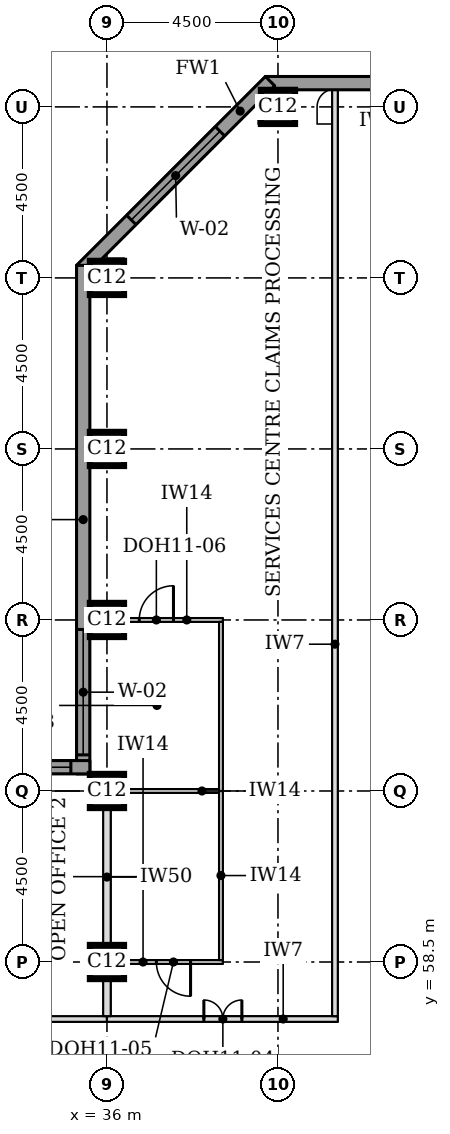
"""IFC4 building model, lengths in metres.
Left out: names, types, materials, properties, quantities, classifications, styles, units other than length and angle.
Written with IfcOpenShell. Run it as: python <this file> out.ifc"""

import sys

from ifc_helpers import new_model, si_unit, direction, frame, frame_2d, origin, origin_2d, place, context, subcontext, project, spatial, rectangle, extrude, element, fill, save


model = new_model("IFC4")
c1 = context("Model", 3, precision=1e-05, world=origin(), true_north=direction((0.0, 1.0)))
c2 = subcontext(c1, "Body", "Model", "MODEL_VIEW")
j1 = project(units=[si_unit("LENGTHUNIT", "METRE"), si_unit("PLANEANGLEUNIT", "RADIAN")], contexts=[c1])
p1 = place(None, origin())
s1 = spatial("IfcSite", under=j1, at=p1, CompositionType="ELEMENT")
p2 = place(p1, origin())
s2 = spatial("IfcBuilding", under=s1, at=p2, CompositionType="ELEMENT")
p3 = place(p2, frame((0.0, 0.0, 237.8)))
s3 = spatial("IfcBuildingStorey", under=s2, at=p3, CompositionType="ELEMENT", Elevation=237.8)
for number, where, z_axis, x_axis in (
    (1, (36.0, 58.5, 0.0), (0.0, 0.0, 1.0), (1.0, 0.0, 0.0)),
    (2, (36.0, 63.0, 0.0), (0.0, 0.0, 1.0), (1.0, 0.0, 0.0)),
    (3, (36.0, 67.5, 0.0), (0.0, 0.0, 1.0), (1.0, 0.0, 0.0)),
    (4, (36.0, 72.0, 0.0), (0.0, 0.0, 1.0), (1.0, 0.0, 0.0)),
    (5, (36.0, 76.5, 0.0), (0.0, 0.0, 1.0), (1.0, 0.0, 0.0)),
    (6, (40.5, 81.0, 0.0), (0.0, 0.0, 1.0), (1.0, 0.0, 0.0)),
):
    element("IfcColumn", number, at=place(p3, frame(where, z_axis=z_axis, x_axis=x_axis)), inside=s3, PredefinedType="COLUMN", context=c2, shape_type="SweptSolid", body=[
        extrude(rectangle(XDim=0.9, YDim=0.9, at=origin_2d()), origin(), (0.0, 0.0, 1.0), 3.7),
    ])
p4 = place(p3, frame((72.331, 81.625, 0.0), z_axis=(0.0, 0.0, 1.0), x_axis=(-1.0, 0.0, 0.0)))
e7 = element("IfcWall", 7, at=p4, inside=s3, PredefinedType="STANDARD", context=c2, shape_type="SweptSolid", body=[
    extrude(rectangle(XDim=32.163, YDim=0.35, at=frame_2d((16.081, 0.0))), origin(), (0.0, 0.0, 1.0), 3.525),
])
p5 = place(p4, frame((5.431, 0.0, 0.9)))
e8 = element("IfcOpeningElement", 8, at=p5, cuts=e7, PredefinedType="OPENING", context=c2, shape_type="SweptSolid", body=[
    extrude(rectangle(XDim=3.3, YDim=1.9, at=frame_2d((1.65, 0.95))), frame((0.0, 0.185, 0.0), z_axis=(0.0, -1.0, 0.0), x_axis=(1.0, 0.0, 0.0)), (0.0, 0.0, 1.0), 0.37),
])
p6 = place(p4, frame((9.931, 0.0, 0.9)))
e9 = element("IfcOpeningElement", 9, at=p6, cuts=e7, PredefinedType="OPENING", context=c2, shape_type="SweptSolid", body=[
    extrude(rectangle(XDim=3.3, YDim=1.9, at=frame_2d((1.65, 0.95))), frame((0.0, 0.185, 0.0), z_axis=(0.0, -1.0, 0.0), x_axis=(1.0, 0.0, 0.0)), (0.0, 0.0, 1.0), 0.37),
])
p7 = place(p4, frame((14.431, 0.0, 0.9)))
e10 = element("IfcOpeningElement", 10, at=p7, cuts=e7, PredefinedType="OPENING", context=c2, shape_type="SweptSolid", body=[
    extrude(rectangle(XDim=3.3, YDim=1.9, at=frame_2d((1.65, 0.95))), frame((0.0, 0.185, 0.0), z_axis=(0.0, -1.0, 0.0), x_axis=(1.0, 0.0, 0.0)), (0.0, 0.0, 1.0), 0.37),
])
p8 = place(p4, frame((18.931, 0.0, 0.9)))
e11 = element("IfcOpeningElement", 11, at=p8, cuts=e7, PredefinedType="OPENING", context=c2, shape_type="SweptSolid", body=[
    extrude(rectangle(XDim=3.3, YDim=1.9, at=frame_2d((1.65, 0.95))), frame((0.0, 0.185, 0.0), z_axis=(0.0, -1.0, 0.0), x_axis=(1.0, 0.0, 0.0)), (0.0, 0.0, 1.0), 0.37),
])
p9 = place(p4, frame((23.431, 0.0, 0.9)))
e12 = element("IfcOpeningElement", 12, at=p9, cuts=e7, PredefinedType="OPENING", context=c2, shape_type="SweptSolid", body=[
    extrude(rectangle(XDim=3.3, YDim=1.9, at=frame_2d((1.65, 0.95))), frame((0.0, 0.185, 0.0), z_axis=(0.0, -1.0, 0.0), x_axis=(1.0, 0.0, 0.0)), (0.0, 0.0, 1.0), 0.37),
])
p10 = place(p3, frame((40.292, 81.676, 0.0), z_axis=(0.0, 0.0, 1.0), x_axis=(-0.707106781187, -0.707106781187, 0.0)))
e13 = element("IfcWall", 13, at=p10, inside=s3, PredefinedType="STANDARD", context=c2, shape_type="SweptSolid", body=[
    extrude(rectangle(XDim=7.027, YDim=0.35, at=frame_2d((3.513, 0.0))), origin(), (0.0, 0.0, 1.0), 3.525),
])
p11 = place(p10, frame((1.863, 0.0, 0.9)))
e14 = element("IfcOpeningElement", 14, at=p11, cuts=e13, PredefinedType="OPENING", context=c2, shape_type="SweptSolid", body=[
    extrude(rectangle(XDim=3.3, YDim=1.9, at=frame_2d((1.65, 0.95))), frame((0.0, 0.185, 0.0), z_axis=(0.0, -1.0, 0.0), x_axis=(1.0, 0.0, 0.0)), (0.0, 0.0, 1.0), 0.37),
])
p12 = place(p3, frame((35.375, 76.831, 0.0), z_axis=(0.0, 0.0, 1.0), x_axis=(0.0, -1.0, 0.0)))
e15 = element("IfcWall", 15, at=p12, inside=s3, PredefinedType="STANDARD", context=c2, shape_type="SweptSolid", body=[
    extrude(rectangle(XDim=13.381, YDim=0.35, at=frame_2d((6.691, 0.0))), origin(), (0.0, 0.0, 1.0), 3.525),
])
p13 = place(p12, frame((9.581, 0.0, 0.9)))
e16 = element("IfcOpeningElement", 16, at=p13, cuts=e15, PredefinedType="OPENING", context=c2, shape_type="SweptSolid", body=[
    extrude(rectangle(XDim=3.3, YDim=1.9, at=frame_2d((1.65, 0.95))), frame((0.0, 0.185, 0.0), z_axis=(0.0, -1.0, 0.0), x_axis=(1.0, 0.0, 0.0)), (0.0, 0.0, 1.0), 0.37),
])
p14 = place(p3, frame((35.55, 63.625, 0.0), z_axis=(0.0, 0.0, 1.0), x_axis=(-1.0, 0.0, 0.0)))
e17 = element("IfcWall", 17, at=p14, inside=s3, PredefinedType="STANDARD", context=c2, shape_type="SweptSolid", body=[
    extrude(rectangle(XDim=17.881, YDim=0.35, at=frame_2d((8.941, 0.0))), origin(), (0.0, 0.0, 1.0), 3.525),
])
p15 = place(p14, frame((0.5, 0.0, 0.9)))
e18 = element("IfcOpeningElement", 18, at=p15, cuts=e17, PredefinedType="OPENING", context=c2, shape_type="SweptSolid", body=[
    extrude(rectangle(XDim=3.3, YDim=1.9, at=frame_2d((1.65, 0.95))), frame((0.0, 0.185, 0.0), z_axis=(0.0, -1.0, 0.0), x_axis=(1.0, 0.0, 0.0)), (0.0, 0.0, 1.0), 0.37),
])
p16 = place(p14, frame((9.15, 0.0, 0.9)))
e19 = element("IfcOpeningElement", 19, at=p16, cuts=e17, PredefinedType="OPENING", context=c2, shape_type="SweptSolid", body=[
    extrude(rectangle(XDim=3.3, YDim=1.9, at=frame_2d((1.65, 0.95))), frame((0.0, 0.185, 0.0), z_axis=(0.0, -1.0, 0.0), x_axis=(1.0, 0.0, 0.0)), (0.0, 0.0, 1.0), 0.37),
])
p17 = place(p3, frame((29.38, 57.0, 0.0), z_axis=(0.0, 0.0, 1.0), x_axis=(1.0, 0.0, 0.0)))
e20 = element("IfcWall", 20, at=p17, inside=s3, PredefinedType="PARTITIONING", context=c2, shape_type="SweptSolid", body=[
    extrude(rectangle(XDim=6.62, YDim=0.15, at=frame_2d((3.31, 0.0))), origin(), (0.0, 0.0, 1.0), 3.55),
])
p18 = place(p17, frame((2.88, 0.0, 0.0)))
e21 = element("IfcOpeningElement", 21, at=p18, cuts=e20, PredefinedType="OPENING", context=c2, shape_type="SweptSolid", body=[
    extrude(rectangle(XDim=1.0, YDim=2.1, at=frame_2d((0.5, 1.05))), frame((0.0, 0.085, 0.0), z_axis=(0.0, -1.0, 0.0), x_axis=(1.0, 0.0, 0.0)), (0.0, 0.0, 1.0), 0.17),
])
p19 = place(p3, frame((36.0, 57.0, 0.0), z_axis=(0.0, 0.0, 1.0), x_axis=(1.0, 0.0, 0.0)))
e22 = element("IfcWall", 22, at=p19, inside=s3, PredefinedType="PARTITIONING", context=c2, shape_type="SweptSolid", body=[
    extrude(rectangle(XDim=6.075, YDim=0.15, at=frame_2d((3.038, 0.0))), origin(), (0.0, 0.0, 1.0), 3.55),
])
p20 = place(p19, frame((2.55, 0.0, 0.0)))
e23 = element("IfcOpeningElement", 23, at=p20, cuts=e22, PredefinedType="OPENING", context=c2, shape_type="SweptSolid", body=[
    extrude(rectangle(XDim=1.0, YDim=2.1, at=frame_2d((0.5, 1.05))), frame((0.0, 0.085, 0.0), z_axis=(0.0, -1.0, 0.0), x_axis=(1.0, 0.0, 0.0)), (0.0, 0.0, 1.0), 0.17),
])
p21 = place(p3, frame((36.45, 58.5, 0.0), z_axis=(0.0, 0.0, 1.0), x_axis=(1.0, 0.0, 0.0)))
e24 = element("IfcWall", 24, at=p21, inside=s3, PredefinedType="PARTITIONING", context=c2, shape_type="SweptSolid", body=[
    extrude(rectangle(XDim=2.6, YDim=0.1, at=frame_2d((1.3, 0.0))), origin(), (0.0, 0.0, 1.0), 3.55),
])
p22 = place(p21, frame((0.85, 0.0, 0.0)))
e25 = element("IfcOpeningElement", 25, at=p22, cuts=e24, PredefinedType="OPENING", context=c2, shape_type="SweptSolid", body=[
    extrude(rectangle(XDim=0.9, YDim=2.1, at=frame_2d((0.45, 1.05))), frame((0.0, 0.06, 0.0), z_axis=(0.0, -1.0, 0.0), x_axis=(1.0, 0.0, 0.0)), (0.0, 0.0, 1.0), 0.12),
])
p23 = place(p3, frame((36.45, 63.0, 0.0), z_axis=(0.0, 0.0, 1.0), x_axis=(1.0, 0.0, 0.0)))
e26 = element("IfcWall", 26, at=p23, inside=s3, PredefinedType="PARTITIONING", context=c2, shape_type="SweptSolid", body=[
    extrude(rectangle(XDim=2.5, YDim=0.1, at=frame_2d((1.25, 0.0))), origin(), (0.0, 0.0, 1.0), 3.55),
])
p24 = place(p3, frame((35.55, 67.5, 0.0), z_axis=(0.0, 0.0, 1.0), x_axis=(1.0, 0.0, 0.0)))
e27 = element("IfcWall", 27, at=p24, inside=s3, PredefinedType="PARTITIONING", context=c2, shape_type="SweptSolid", body=[
    extrude(rectangle(XDim=3.5, YDim=0.1, at=frame_2d((1.75, 0.0))), origin(), (0.0, 0.0, 1.0), 3.55),
])
p25 = place(p24, frame((1.3, 0.0, 0.0)))
e28 = element("IfcOpeningElement", 28, at=p25, cuts=e27, PredefinedType="OPENING", context=c2, shape_type="SweptSolid", body=[
    extrude(rectangle(XDim=0.9, YDim=2.1, at=frame_2d((0.45, 1.05))), frame((0.0, 0.06, 0.0), z_axis=(0.0, -1.0, 0.0), x_axis=(1.0, 0.0, 0.0)), (0.0, 0.0, 1.0), 0.12),
])
p26 = place(p3, frame((36.0, 57.075, 0.0), z_axis=(0.0, 0.0, 1.0), x_axis=(0.0, 1.0, 0.0)))
e29 = element("IfcWall", 29, at=p26, inside=s3, PredefinedType="PARTITIONING", context=c2, shape_type="SweptSolid", body=[
    extrude(rectangle(XDim=0.975, YDim=0.2, at=frame_2d((0.488, 0.0))), origin(), (0.0, 0.0, 1.0), 2.8),
])
p27 = place(p3, frame((42.0, 57.075, 0.0), z_axis=(0.0, 0.0, 1.0), x_axis=(0.0, 1.0, 0.0)))
e30 = element("IfcWall", 30, at=p27, inside=s3, PredefinedType="PARTITIONING", context=c2, shape_type="SweptSolid", body=[
    extrude(rectangle(XDim=24.375, YDim=0.15, at=frame_2d((12.188, 0.0))), origin(), (0.0, 0.0, 1.0), 3.55),
])
p28 = place(p3, frame((39.0, 58.55, 0.0), z_axis=(0.0, 0.0, 1.0), x_axis=(0.0, 1.0, 0.0)))
e31 = element("IfcWall", 31, at=p28, inside=s3, PredefinedType="PARTITIONING", context=c2, shape_type="SweptSolid", body=[
    extrude(rectangle(XDim=4.45, YDim=0.1, at=frame_2d((2.225, 0.0))), origin(), (0.0, 0.0, 1.0), 3.55),
])
p29 = place(p3, frame((36.0, 58.92, 0.0), z_axis=(0.0, 0.0, 1.0), x_axis=(0.0, 1.0, 0.0)))
e32 = element("IfcWall", 32, at=p29, inside=s3, PredefinedType="PARTITIONING", context=c2, shape_type="SweptSolid", body=[
    extrude(rectangle(XDim=3.63, YDim=0.2, at=frame_2d((1.815, 0.0))), origin(), (0.0, 0.0, 1.0), 2.8),
])
p30 = place(p3, frame((39.0, 63.0, 0.0), z_axis=(0.0, 0.0, 1.0), x_axis=(0.0, 1.0, 0.0)))
e33 = element("IfcWall", 33, at=p30, inside=s3, PredefinedType="PARTITIONING", context=c2, shape_type="SweptSolid", body=[
    extrude(rectangle(XDim=4.45, YDim=0.1, at=frame_2d((2.225, 0.0))), origin(), (0.0, 0.0, 1.0), 3.55),
])
p31 = place(p11, origin())
e34 = element("IfcWindow", 34, at=p31, inside=s3, PartitioningType="SINGLE_PANEL", PredefinedType="WINDOW", context=c2, shape_type="SweptSolid", body=[
    extrude(rectangle(XDim=3.3, YDim=1.9, at=frame_2d((1.65, 0.95))), frame((0.0, 0.085, 0.0), z_axis=(0.0, -1.0, 0.0), x_axis=(1.0, 0.0, 0.0)), (0.0, 0.0, 1.0), 0.06),
])
fill(e14, e34)
p32 = place(p13, origin())
e35 = element("IfcWindow", 35, at=p32, inside=s3, PartitioningType="SINGLE_PANEL", PredefinedType="WINDOW", context=c2, shape_type="SweptSolid", body=[
    extrude(rectangle(XDim=3.3, YDim=1.9, at=frame_2d((1.65, 0.95))), frame((0.0, 0.085, 0.0), z_axis=(0.0, -1.0, 0.0), x_axis=(1.0, 0.0, 0.0)), (0.0, 0.0, 1.0), 0.06),
])
fill(e16, e35)
p33 = place(p15, origin())
e36 = element("IfcWindow", 36, at=p33, inside=s3, PartitioningType="SINGLE_PANEL", PredefinedType="WINDOW", context=c2, shape_type="SweptSolid", body=[
    extrude(rectangle(XDim=3.3, YDim=1.9, at=frame_2d((1.65, 0.95))), frame((0.0, 0.085, 0.0), z_axis=(0.0, -1.0, 0.0), x_axis=(1.0, 0.0, 0.0)), (0.0, 0.0, 1.0), 0.06),
])
fill(e18, e36)
p34 = place(p20, origin())
e37 = element("IfcDoor", 37, at=p34, inside=s3, OperationType="DOUBLE_DOOR_SINGLE_SWING", PredefinedType="DOOR", context=c2, shape_type="SweptSolid", body=[
    extrude(rectangle(XDim=1.0, YDim=2.1, at=frame_2d((0.5, 1.05))), frame((0.0, 0.025, 0.0), z_axis=(0.0, -1.0, 0.0), x_axis=(1.0, 0.0, 0.0)), (0.0, 0.0, 1.0), 0.05),
])
fill(e23, e37)
p35 = place(p22, frame((0.9, 0.0, 0.0), z_axis=(0.0, 0.0, 1.0), x_axis=(-1.0, 0.0, 0.0)))
e38 = element("IfcDoor", 38, at=p35, inside=s3, OperationType="SINGLE_SWING_LEFT", PredefinedType="DOOR", context=c2, shape_type="SweptSolid", body=[
    extrude(rectangle(XDim=0.9, YDim=2.1, at=frame_2d((0.45, 1.05))), frame((0.0, 0.025, 0.0), z_axis=(0.0, -1.0, 0.0), x_axis=(1.0, 0.0, 0.0)), (0.0, 0.0, 1.0), 0.05),
])
fill(e25, e38)
p36 = place(p25, origin())
e39 = element("IfcDoor", 39, at=p36, inside=s3, OperationType="SINGLE_SWING_RIGHT", PredefinedType="DOOR", context=c2, shape_type="SweptSolid", body=[
    extrude(rectangle(XDim=0.9, YDim=2.1, at=frame_2d((0.45, 1.05))), frame((0.0, 0.025, 0.0), z_axis=(0.0, -1.0, 0.0), x_axis=(1.0, 0.0, 0.0)), (0.0, 0.0, 1.0), 0.05),
])
fill(e28, e39)
save(model, sys.argv[1])
